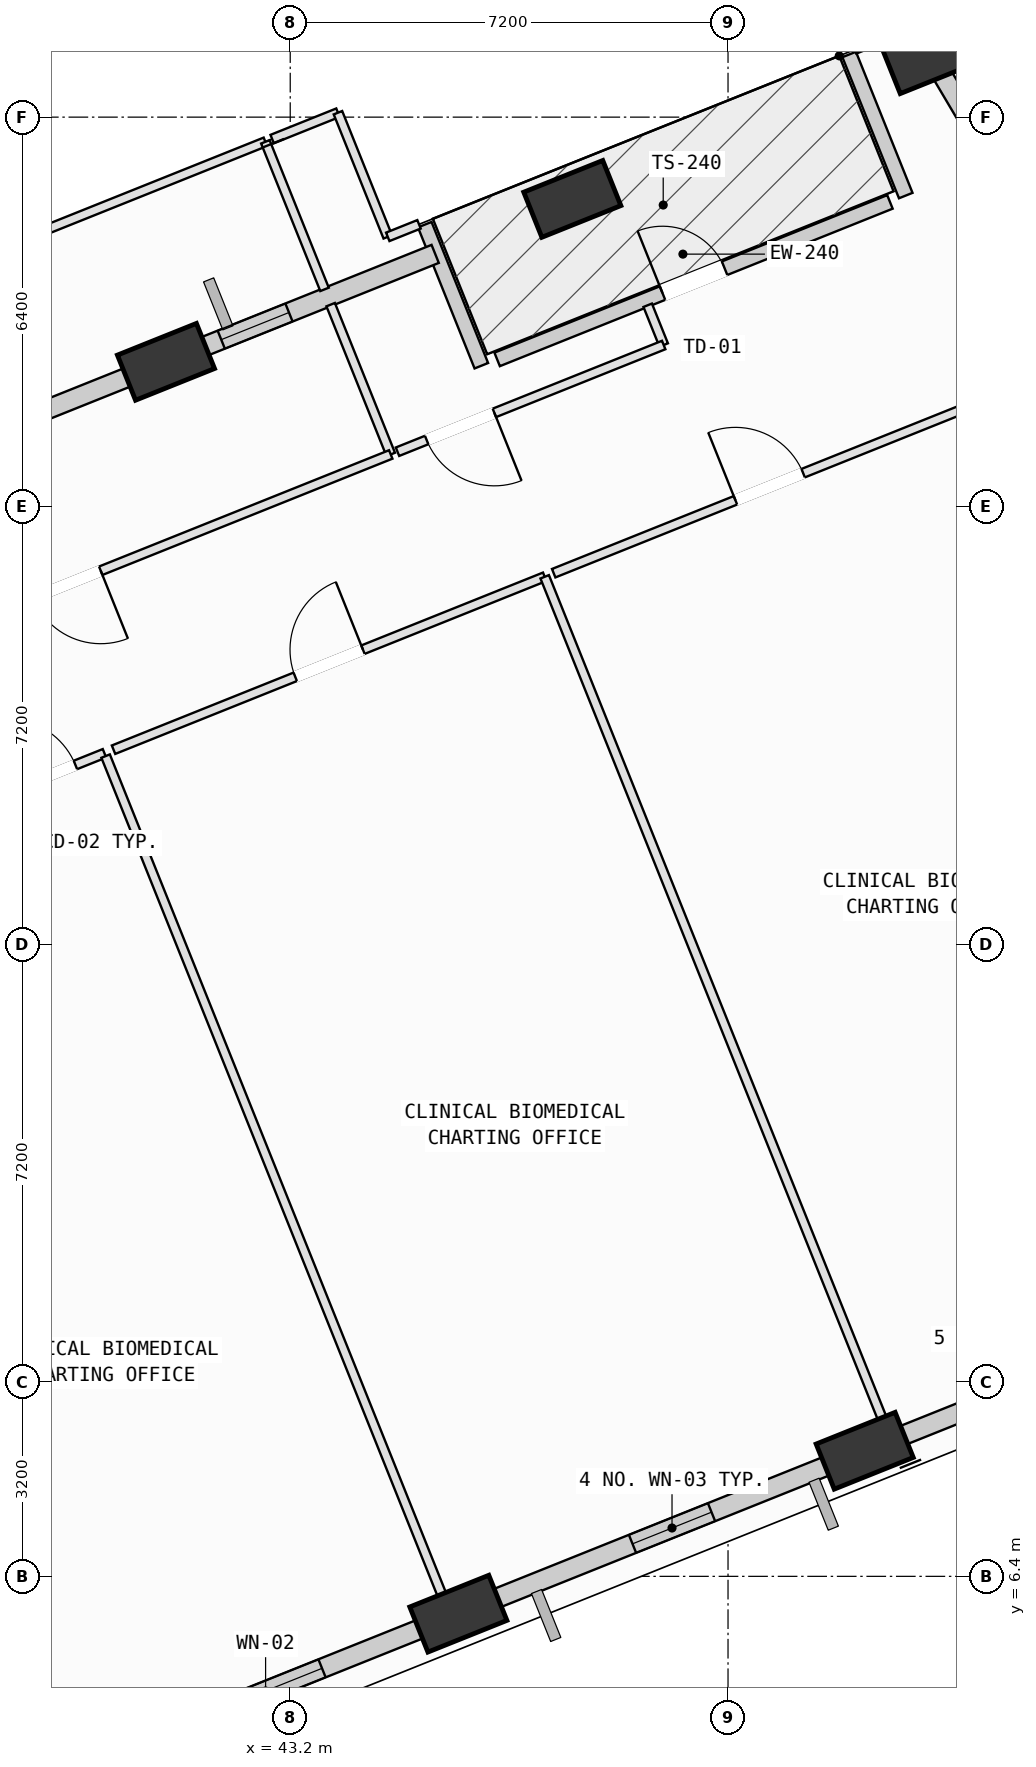
"""IFC4 building model, lengths in metres.
Left out: names, types, materials, properties, quantities, classifications, styles, units other than length and angle.
Written with IfcOpenShell. Run it as: python <this file> out.ifc"""

import sys

from ifc_helpers import new_model, si_unit, direction, frame, frame_2d, origin, origin_2d, place, context, subcontext, project, spatial, rectangle, extrude, element, fill, save


model = new_model("IFC4")
c1 = context("Model", 3, precision=1e-05, world=origin(), true_north=direction((0.0, 1.0)))
c2 = subcontext(c1, "Body", "Model", "MODEL_VIEW")
j1 = project(units=[si_unit("LENGTHUNIT", "METRE"), si_unit("PLANEANGLEUNIT", "RADIAN")], contexts=[c1])
p1 = place(None, origin())
s1 = spatial("IfcSite", under=j1, at=p1, CompositionType="ELEMENT")
p2 = place(p1, origin())
s2 = spatial("IfcBuilding", under=s1, at=p2, CompositionType="ELEMENT")
p3 = place(p2, frame((0.0, 0.0, 116.4)))
s3 = spatial("IfcBuildingStorey", under=s2, at=p3, CompositionType="ELEMENT", Elevation=116.4)
p4 = place(p3, frame((45.965, 5.786, 0.002), z_axis=(0.078035956114, 0.051638758177, 0.995612288096), x_axis=(-0.821217291899, 0.569551828945, 0.034826335313)))
e1 = element("IfcColumn", 1, at=p4, inside=s3, PredefinedType="COLUMN", context=c2, shape_type="SweptSolid", body=[
    extrude(rectangle(XDim=1.4, YDim=0.8, at=origin_2d()), origin(), (0.0, 0.0, 1.0), 4.014),
])
p5 = place(p3, frame((52.648, 8.466, 0.002), z_axis=(0.066717836338, 0.079113499919, 0.99463047633), x_axis=(-0.948183509475, 0.31537991624, 0.038516759879)))
e2 = element("IfcColumn", 2, at=p5, inside=s3, PredefinedType="COLUMN", context=c2, shape_type="SweptSolid", body=[
    extrude(rectangle(XDim=1.4, YDim=0.8, at=origin_2d()), origin(), (0.0, 0.0, 1.0), 4.018),
])
p6 = place(p3, frame((53.733, 31.419, 0.002), z_axis=(-0.027994148358, 0.082887021878, 0.99616568364), x_axis=(-0.760728692831, -0.648252775362, 0.032560637873)))
e3 = element("IfcColumn", 3, at=p6, inside=s3, PredefinedType="COLUMN", context=c2, shape_type="SweptSolid", body=[
    extrude(rectangle(XDim=1.4, YDim=0.8, at=origin_2d()), origin(), (0.0, 0.0, 1.0), 4.012),
])
p7 = place(p3, frame((47.839, 29.055, 0.002), z_axis=(-0.018048809142, 0.058719605418, 0.998111340697), x_axis=(-0.778054912845, -0.627780077744, 0.022863214654)))
e4 = element("IfcColumn", 4, at=p7, inside=s3, PredefinedType="COLUMN", context=c2, shape_type="SweptSolid", body=[
    extrude(rectangle(XDim=1.4, YDim=0.8, at=origin_2d()), origin(), (0.0, 0.0, 1.0), 4.004),
])
p8 = place(p3, frame((41.156, 26.375, 0.002), z_axis=(-0.006777640232, 0.031262628818, 0.999488224859), x_axis=(-0.828274350802, -0.560196266994, 0.011905555365)))
e5 = element("IfcColumn", 5, at=p8, inside=s3, PredefinedType="COLUMN", context=c2, shape_type="SweptSolid", body=[
    extrude(rectangle(XDim=1.4, YDim=0.8, at=origin_2d()), origin(), (0.0, 0.0, 1.0), 3.998),
])
p9 = place(p3, frame((46.603, 26.415, 0.0), z_axis=(0.0, 0.0, 1.0), x_axis=(0.928154607931, 0.372194873389, 0.0)))
e6 = element("IfcWall", 6, at=p9, inside=s3, PredefinedType="SOLIDWALL", context=c2, shape_type="SweptSolid", body=[
    extrude(rectangle(XDim=6.96, YDim=0.24, at=frame_2d((3.48, 0.0))), origin(), (0.0, 0.0, 1.0), 2.945),
])
p10 = place(p9, frame((2.93, 0.0, 0.0)))
e7 = element("IfcOpeningElement", 7, at=p10, cuts=e6, PredefinedType="OPENING", context=c2, shape_type="SweptSolid", body=[
    extrude(rectangle(XDim=1.1, YDim=2.15, at=frame_2d((0.55, 1.075))), frame((0.0, 0.13, 0.0), z_axis=(0.0, -1.0, 0.0), x_axis=(1.0, 0.0, 0.0)), (0.0, 0.0, 1.0), 0.26),
])
for number, where, z_axis, x_axis in (
    (8, (45.413, 28.632, 0.0), (0.0, 0.0, 1.0), (0.372, -0.928, 0.0)),
    (9, (53.323, 29.11, 0.0), (0.0, 0.0, 1.0), (-0.372, 0.928, 0.0)),
):
    element("IfcWall", number, at=place(p3, frame(where, z_axis=z_axis, x_axis=x_axis)), inside=s3, PredefinedType="SOLIDWALL", context=c2, shape_type="SweptSolid", body=[
        extrude(rectangle(XDim=2.5, YDim=0.24, at=frame_2d((1.25, 0.0))), origin(), (0.0, 0.0, 1.0), 3.165),
    ])
p11 = place(p3, frame((45.677, 5.67, 0.0), z_axis=(0.0, 0.0, 1.0), x_axis=(-0.928164509938, -0.372170179477, 0.0)))
e10 = element("IfcWall", 10, at=p11, inside=s3, PredefinedType="SOLIDWALL", context=c2, shape_type="SweptSolid", body=[
    extrude(rectangle(XDim=6.209, YDim=0.32, at=frame_2d((3.104, 0.0))), origin(), (0.0, 0.0, 1.0), 3.165),
])
p12 = place(p11, frame((2.105, 0.0, 0.75)))
e11 = element("IfcOpeningElement", 11, at=p12, cuts=e10, PredefinedType="OPENING", context=c2, shape_type="SweptSolid", body=[
    extrude(rectangle(XDim=2.0, YDim=1.95, at=frame_2d((1.0, 0.975))), frame((0.0, 0.17, 0.0), z_axis=(0.0, -1.0, 0.0), x_axis=(1.0, 0.0, 0.0)), (0.0, 0.0, 1.0), 0.34),
])
p13 = place(p3, frame((52.366, 8.353, 0.0), z_axis=(0.0, 0.0, 1.0), x_axis=(-0.928164972463, -0.372169025972, 0.0)))
e12 = element("IfcWall", 12, at=p13, inside=s3, PredefinedType="SOLIDWALL", context=c2, shape_type="SweptSolid", body=[
    extrude(rectangle(XDim=6.218, YDim=0.32, at=frame_2d((3.109, 0.0))), origin(), (0.0, 0.0, 1.0), 3.165),
])
p14 = place(p13, frame((2.411, 0.0, 0.75)))
e13 = element("IfcOpeningElement", 13, at=p14, cuts=e12, PredefinedType="OPENING", context=c2, shape_type="SweptSolid", body=[
    extrude(rectangle(XDim=1.4, YDim=1.85, at=frame_2d((0.7, 0.925))), frame((0.0, 0.17, 0.0), z_axis=(0.0, -1.0, 0.0), x_axis=(1.0, 0.0, 0.0)), (0.0, 0.0, 1.0), 0.34),
])
p15 = place(p3, frame((59.064, 11.038, 0.0), z_axis=(0.0, 0.0, 1.0), x_axis=(-0.928163479726, -0.372172748739, 0.0)))
e14 = element("IfcWall", 14, at=p15, inside=s3, PredefinedType="SOLIDWALL", context=c2, shape_type="SweptSolid", body=[
    extrude(rectangle(XDim=6.242, YDim=0.32, at=frame_2d((3.121, 0.0))), origin(), (0.0, 0.0, 1.0), 3.165),
])
p16 = place(p15, frame((3.14, 0.0, 0.75)))
e15 = element("IfcOpeningElement", 15, at=p16, cuts=e14, PredefinedType="OPENING", context=c2, shape_type="SweptSolid", body=[
    extrude(rectangle(XDim=1.8, YDim=2.05, at=frame_2d((0.9, 1.025))), frame((0.0, 0.17, 0.0), z_axis=(0.0, -1.0, 0.0), x_axis=(1.0, 0.0, 0.0)), (0.0, 0.0, 1.0), 0.34),
])
p17 = place(p3, frame((53.898, 31.141, 0.0), z_axis=(0.0, 0.0, 1.0), x_axis=(0.50965320776, -0.860379920628, 0.0)))
e16 = element("IfcWall", 16, at=p17, inside=s3, PredefinedType="SOLIDWALL", context=c2, shape_type="SweptSolid", body=[
    extrude(rectangle(XDim=8.838, YDim=0.32, at=frame_2d((4.419, 0.0))), origin(), (0.0, 0.0, 1.0), 3.165),
])
p18 = place(p3, frame((41.623, 26.563, 0.0), z_axis=(0.0, 0.0, 1.0), x_axis=(0.928156727061, 0.372189588801, 0.0)))
e17 = element("IfcWall", 17, at=p18, inside=s3, PredefinedType="SOLIDWALL", context=c2, shape_type="SweptSolid", body=[
    extrude(rectangle(XDim=4.267, YDim=0.32, at=frame_2d((2.134, 0.0))), origin(), (0.0, 0.0, 1.0), 3.145),
])
p19 = place(p18, frame((0.477, 0.0, 0.75)))
e18 = element("IfcOpeningElement", 18, at=p19, cuts=e17, PredefinedType="OPENING", context=c2, shape_type="SweptSolid", body=[
    extrude(rectangle(XDim=1.2, YDim=1.75, at=frame_2d((0.6, 0.875))), frame((0.0, 0.17, 0.0), z_axis=(0.0, -1.0, 0.0), x_axis=(1.0, 0.0, 0.0)), (0.0, 0.0, 1.0), 0.34),
])
p20 = place(p3, frame((34.945, 23.885, 0.0), z_axis=(0.0, 0.0, 1.0), x_axis=(0.928167331389, 0.372163142912, 0.0)))
e19 = element("IfcWall", 19, at=p20, inside=s3, PredefinedType="SOLIDWALL", context=c2, shape_type="SweptSolid", body=[
    extrude(rectangle(XDim=6.211, YDim=0.32, at=frame_2d((3.105, 0.0))), origin(), (0.0, 0.0, 1.0), 3.165),
])
p21 = place(p20, frame((0.816, 0.0, 0.75)))
e20 = element("IfcOpeningElement", 20, at=p21, cuts=e19, PredefinedType="OPENING", context=c2, shape_type="SweptSolid", body=[
    extrude(rectangle(XDim=1.8, YDim=2.05, at=frame_2d((0.9, 1.025))), frame((0.0, 0.17, 0.0), z_axis=(0.0, -1.0, 0.0), x_axis=(1.0, 0.0, 0.0)), (0.0, 0.0, 1.0), 0.34),
])
p22 = place(p3, frame((38.076, 19.107, 0.0), z_axis=(0.0, 0.0, 1.0), x_axis=(0.928098589705, 0.372334537463, 0.0)))
e21 = element("IfcWall", 21, at=p22, inside=s3, PredefinedType="PARTITIONING", context=c2, shape_type="SweptSolid", body=[
    extrude(rectangle(XDim=2.229, YDim=0.15, at=frame_2d((1.115, 0.0))), origin(), (0.0, 0.0, 1.0), 2.945),
])
p23 = place(p22, frame((0.515, 0.0, 0.0)))
e22 = element("IfcOpeningElement", 22, at=p23, cuts=e21, PredefinedType="OPENING", context=c2, shape_type="SweptSolid", body=[
    extrude(rectangle(XDim=1.2, YDim=2.15, at=frame_2d((0.6, 1.075))), frame((0.0, 0.085, 0.0), z_axis=(0.0, -1.0, 0.0), x_axis=(1.0, 0.0, 0.0)), (0.0, 0.0, 1.0), 0.17),
])
p24 = place(p3, frame((40.164, 19.891, 0.0), z_axis=(0.0, 0.0, 1.0), x_axis=(0.372132851531, -0.928179476616, 0.0)))
e23 = element("IfcWall", 23, at=p24, inside=s3, PredefinedType="PARTITIONING", context=c2, shape_type="SweptSolid", body=[
    extrude(rectangle(XDim=15.481, YDim=0.15, at=frame_2d((7.74, 0.0))), origin(), (0.0, 0.0, 1.0), 3.78),
])
p25 = place(p3, frame((40.294, 19.996, 0.0), z_axis=(0.0, 0.0, 1.0), x_axis=(0.928134709593, 0.372244490689, 0.0)))
e24 = element("IfcWall", 24, at=p25, inside=s3, PredefinedType="PARTITIONING", context=c2, shape_type="SweptSolid", body=[
    extrude(rectangle(XDim=7.64, YDim=0.15, at=frame_2d((3.82, 0.0))), origin(), (0.0, 0.0, 1.0), 3.78),
])
p26 = place(p25, frame((3.22, 0.0, 0.0)))
e25 = element("IfcOpeningElement", 25, at=p26, cuts=e24, PredefinedType="OPENING", context=c2, shape_type="SweptSolid", body=[
    extrude(rectangle(XDim=1.2, YDim=2.15, at=frame_2d((0.6, 1.075))), frame((0.0, 0.085, 0.0), z_axis=(0.0, -1.0, 0.0), x_axis=(1.0, 0.0, 0.0)), (0.0, 0.0, 1.0), 0.17),
])
p27 = place(p3, frame((47.385, 22.84, 0.0), z_axis=(0.0, 0.0, 1.0), x_axis=(0.372168409569, -0.928165219624, 0.0)))
e26 = element("IfcWall", 26, at=p27, inside=s3, PredefinedType="PARTITIONING", context=c2, shape_type="SweptSolid", body=[
    extrude(rectangle(XDim=15.531, YDim=0.15, at=frame_2d((7.765, 0.0))), origin(), (0.0, 0.0, 1.0), 3.78),
])
p28 = place(p3, frame((53.165, 8.425, 0.0), z_axis=(0.0, 0.0, 1.0), x_axis=(-0.928081747062, -0.372376517479, 0.0)))
e27 = element("IfcWall", 27, at=p28, inside=s3, PredefinedType="PARTITIONING", context=c2, shape_type="SweptSolid", body=[
    extrude(rectangle(XDim=0.768, YDim=0.15, at=frame_2d((0.384, 0.0))), origin(), (0.0, 0.0, 1.0), 3.165),
])
p29 = place(p3, frame((46.681, 5.825, 0.0), z_axis=(0.0, 0.0, 1.0), x_axis=(-0.92839940505, -0.371583832673, 0.0)))
e28 = element("IfcWall", 28, at=p29, inside=s3, PredefinedType="PARTITIONING", context=c2, shape_type="SweptSolid", body=[
    extrude(rectangle(XDim=0.654, YDim=0.15, at=frame_2d((0.327, 0.0))), origin(), (0.0, 0.0, 1.0), 3.165),
])
p30 = place(p3, frame((47.533, 22.899, 0.0), z_axis=(0.0, 0.0, 1.0), x_axis=(0.928152417976, 0.372200334504, 0.0)))
e29 = element("IfcWall", 29, at=p30, inside=s3, PredefinedType="PARTITIONING", context=c2, shape_type="SweptSolid", body=[
    extrude(rectangle(XDim=7.641, YDim=0.15, at=frame_2d((3.821, 0.0))), origin(), (0.0, 0.0, 1.0), 3.78),
])
p31 = place(p30, frame((3.22, 0.0, 0.0)))
e30 = element("IfcOpeningElement", 30, at=p31, cuts=e29, PredefinedType="OPENING", context=c2, shape_type="SweptSolid", body=[
    extrude(rectangle(XDim=1.2, YDim=2.15, at=frame_2d((0.6, 1.075))), frame((0.0, 0.085, 0.0), z_axis=(0.0, -1.0, 0.0), x_axis=(1.0, 0.0, 0.0)), (0.0, 0.0, 1.0), 0.17),
])
p32 = place(p3, frame((37.302, 27.793, 0.0), z_axis=(0.0, 0.0, 1.0), x_axis=(0.92816603235, 0.372166382673, 0.0)))
e31 = element("IfcWall", 31, at=p32, inside=s3, PredefinedType="PARTITIONING", context=c2, shape_type="SweptSolid", body=[
    extrude(rectangle(XDim=5.914, YDim=0.15, at=frame_2d((2.957, 0.0))), origin(), (0.0, 0.0, 1.0), 3.78),
])
p33 = place(p3, frame((42.791, 29.994, 0.0), z_axis=(0.0, 0.0, 1.0), x_axis=(0.372082805239, -0.928199539994, 0.0)))
e32 = element("IfcWall", 32, at=p33, inside=s3, PredefinedType="PARTITIONING", context=c2, shape_type="SweptSolid", body=[
    extrude(rectangle(XDim=2.615, YDim=0.15, at=frame_2d((1.307, 0.0))), origin(), (0.0, 0.0, 1.0), 3.78),
])
p34 = place(p3, frame((43.865, 27.316, 0.0), z_axis=(0.0, 0.0, 1.0), x_axis=(0.372199229905, -0.928152860933, 0.0)))
e33 = element("IfcWall", 33, at=p34, inside=s3, PredefinedType="PARTITIONING", context=c2, shape_type="SweptSolid", body=[
    extrude(rectangle(XDim=2.655, YDim=0.15, at=frame_2d((1.327, 0.0))), origin(), (0.0, 0.0, 1.0), 3.78),
])
p35 = place(p3, frame((44.853, 24.852, 0.0), z_axis=(0.0, 0.0, 1.0), x_axis=(-0.928153610166, -0.372197361537, 0.0)))
e34 = element("IfcWall", 34, at=p35, inside=s3, PredefinedType="PARTITIONING", context=c2, shape_type="SweptSolid", body=[
    extrude(rectangle(XDim=11.478, YDim=0.15, at=frame_2d((5.739, 0.0))), origin(), (0.0, 0.0, 1.0), 2.945),
])
p36 = place(p35, frame((5.139, 0.0, 0.0)))
e35 = element("IfcOpeningElement", 35, at=p36, cuts=e34, PredefinedType="OPENING", context=c2, shape_type="SweptSolid", body=[
    extrude(rectangle(XDim=1.2, YDim=2.15, at=frame_2d((0.6, 1.075))), frame((0.0, 0.085, 0.0), z_axis=(0.0, -1.0, 0.0), x_axis=(1.0, 0.0, 0.0)), (0.0, 0.0, 1.0), 0.17),
])
p37 = place(p3, frame((49.079, 27.306, 0.0), z_axis=(0.0, 0.0, 1.0), x_axis=(0.373122259618, -0.927782183154, 0.0)))
e36 = element("IfcWall", 36, at=p37, inside=s3, PredefinedType="PARTITIONING", context=c2, shape_type="SweptSolid", body=[
    extrude(rectangle(XDim=0.705, YDim=0.15, at=frame_2d((0.352, 0.0))), origin(), (0.0, 0.0, 1.0), 3.78),
])
p38 = place(p3, frame((49.342, 26.652, 0.0), z_axis=(0.0, 0.0, 1.0), x_axis=(-0.928187259022, -0.372113439946, 0.0)))
e37 = element("IfcWall", 37, at=p38, inside=s3, PredefinedType="PARTITIONING", context=c2, shape_type="SweptSolid", body=[
    extrude(rectangle(XDim=4.717, YDim=0.15, at=frame_2d((2.358, 0.0))), origin(), (0.0, 0.0, 1.0), 2.945),
])
p39 = place(p38, frame((3.0, 0.0, 0.0)))
e38 = element("IfcOpeningElement", 38, at=p39, cuts=e37, PredefinedType="OPENING", context=c2, shape_type="SweptSolid", body=[
    extrude(rectangle(XDim=1.2, YDim=2.15, at=frame_2d((0.6, 1.075))), frame((0.0, 0.085, 0.0), z_axis=(0.0, -1.0, 0.0), x_axis=(1.0, 0.0, 0.0)), (0.0, 0.0, 1.0), 0.17),
])
p40 = place(p3, frame((42.903, 30.039, 0.0), z_axis=(0.0, 0.0, 1.0), x_axis=(0.928173075603, 0.372148816639, 0.0)))
e39 = element("IfcWall", 39, at=p40, inside=s3, PredefinedType="PARTITIONING", context=c2, shape_type="SweptSolid", body=[
    extrude(rectangle(XDim=1.166, YDim=0.15, at=frame_2d((0.583, 0.0))), origin(), (0.0, 0.0, 1.0), 3.78),
])
p41 = place(p3, frame((43.985, 30.473, 0.0), z_axis=(0.0, 0.0, 1.0), x_axis=(0.372194114706, -0.928154912166, 0.0)))
e40 = element("IfcWall", 40, at=p41, inside=s3, PredefinedType="PARTITIONING", context=c2, shape_type="SweptSolid", body=[
    extrude(rectangle(XDim=2.2, YDim=0.15, at=frame_2d((1.1, 0.0))), origin(), (0.0, 0.0, 1.0), 3.78),
])
p42 = place(p3, frame((44.804, 28.431, 0.0), z_axis=(0.0, 0.0, 1.0), x_axis=(0.928233315821, 0.371998536825, 0.0)))
e41 = element("IfcWall", 41, at=p42, inside=s3, PredefinedType="PARTITIONING", context=c2, shape_type="SweptSolid", body=[
    extrude(rectangle(XDim=0.554, YDim=0.15, at=frame_2d((0.277, 0.0))), origin(), (0.0, 0.0, 1.0), 3.145),
])
p43 = place(p10, origin())
e42 = element("IfcDoor", 42, at=p43, inside=s3, OperationType="SINGLE_SWING_LEFT", PredefinedType="DOOR", context=c2, shape_type="SweptSolid", body=[
    extrude(rectangle(XDim=1.1, YDim=2.15, at=frame_2d((0.55, 1.075))), frame((0.0, 0.025, 0.0), z_axis=(0.0, -1.0, 0.0), x_axis=(1.0, 0.0, 0.0)), (0.0, 0.0, 1.0), 0.05),
])
fill(e7, e42)
p44 = place(p12, origin())
e43 = element("IfcWindow", 43, at=p44, inside=s3, PartitioningType="SINGLE_PANEL", PredefinedType="WINDOW", context=c2, shape_type="SweptSolid", body=[
    extrude(rectangle(XDim=2.0, YDim=1.95, at=frame_2d((1.0, 0.975))), frame((0.0, 0.03, 0.0), z_axis=(0.0, -1.0, 0.0), x_axis=(1.0, 0.0, 0.0)), (0.0, 0.0, 1.0), 0.06),
])
fill(e11, e43)
p45 = place(p14, origin())
e44 = element("IfcWindow", 44, at=p45, inside=s3, PartitioningType="SINGLE_PANEL", PredefinedType="WINDOW", context=c2, shape_type="SweptSolid", body=[
    extrude(rectangle(XDim=1.4, YDim=1.85, at=frame_2d((0.7, 0.925))), frame((0.0, 0.03, 0.0), z_axis=(0.0, -1.0, 0.0), x_axis=(1.0, 0.0, 0.0)), (0.0, 0.0, 1.0), 0.06),
])
fill(e13, e44)
p46 = place(p19, origin())
e45 = element("IfcWindow", 45, at=p46, inside=s3, PartitioningType="SINGLE_PANEL", PredefinedType="WINDOW", context=c2, shape_type="SweptSolid", body=[
    extrude(rectangle(XDim=1.2, YDim=1.75, at=frame_2d((0.6, 0.875))), frame((0.0, 0.03, 0.0), z_axis=(0.0, -1.0, 0.0), x_axis=(1.0, 0.0, 0.0)), (0.0, 0.0, 1.0), 0.06),
])
fill(e18, e45)
p47 = place(p23, origin())
e46 = element("IfcDoor", 46, at=p47, inside=s3, OperationType="SINGLE_SWING_LEFT", PredefinedType="DOOR", context=c2, shape_type="SweptSolid", body=[
    extrude(rectangle(XDim=1.2, YDim=2.15, at=frame_2d((0.6, 1.075))), frame((0.0, 0.025, 0.0), z_axis=(0.0, -1.0, 0.0), x_axis=(1.0, 0.0, 0.0)), (0.0, 0.0, 1.0), 0.05),
])
fill(e22, e46)
p48 = place(p26, origin())
e47 = element("IfcDoor", 47, at=p48, inside=s3, OperationType="SINGLE_SWING_RIGHT", PredefinedType="DOOR", context=c2, shape_type="SweptSolid", body=[
    extrude(rectangle(XDim=1.2, YDim=2.15, at=frame_2d((0.6, 1.075))), frame((0.0, 0.025, 0.0), z_axis=(0.0, -1.0, 0.0), x_axis=(1.0, 0.0, 0.0)), (0.0, 0.0, 1.0), 0.05),
])
fill(e25, e47)
p49 = place(p31, origin())
e48 = element("IfcDoor", 48, at=p49, inside=s3, OperationType="SINGLE_SWING_LEFT", PredefinedType="DOOR", context=c2, shape_type="SweptSolid", body=[
    extrude(rectangle(XDim=1.2, YDim=2.15, at=frame_2d((0.6, 1.075))), frame((0.0, 0.025, 0.0), z_axis=(0.0, -1.0, 0.0), x_axis=(1.0, 0.0, 0.0)), (0.0, 0.0, 1.0), 0.05),
])
fill(e30, e48)
p50 = place(p36, origin())
e49 = element("IfcDoor", 49, at=p50, inside=s3, OperationType="SINGLE_SWING_LEFT", PredefinedType="DOOR", context=c2, shape_type="SweptSolid", body=[
    extrude(rectangle(XDim=1.2, YDim=2.15, at=frame_2d((0.6, 1.075))), frame((0.0, 0.025, 0.0), z_axis=(0.0, -1.0, 0.0), x_axis=(1.0, 0.0, 0.0)), (0.0, 0.0, 1.0), 0.05),
])
fill(e35, e49)
p51 = place(p39, origin())
e50 = element("IfcDoor", 50, at=p51, inside=s3, OperationType="SINGLE_SWING_LEFT", PredefinedType="DOOR", context=c2, shape_type="SweptSolid", body=[
    extrude(rectangle(XDim=1.2, YDim=2.15, at=frame_2d((0.6, 1.075))), frame((0.0, 0.025, 0.0), z_axis=(0.0, -1.0, 0.0), x_axis=(1.0, 0.0, 0.0)), (0.0, 0.0, 1.0), 0.05),
])
fill(e38, e50)
save(model, sys.argv[1])
